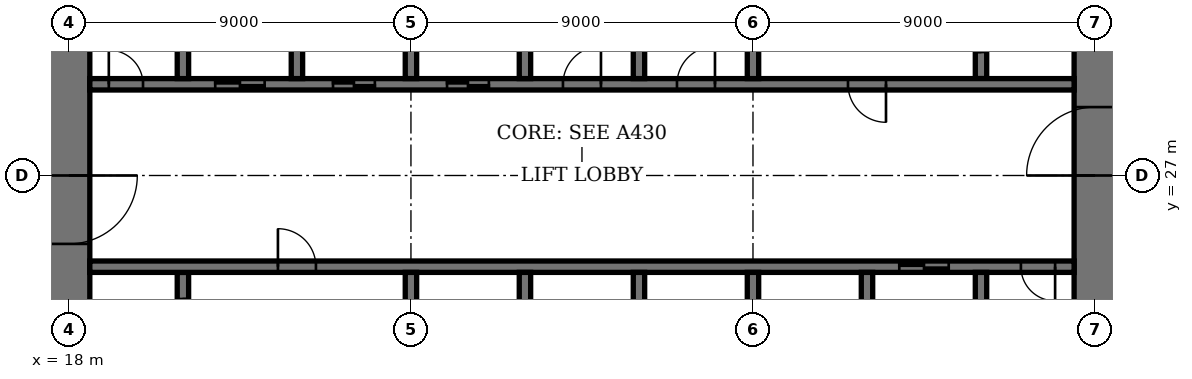
"""IFC4 building model, lengths in metres.
Left out: names, types, materials, properties, quantities, classifications, styles, units other than length and angle.
Written with IfcOpenShell. Run it as: python <this file> out.ifc"""

import sys

from ifc_helpers import new_model, si_unit, direction, frame, frame_2d, origin, place, context, subcontext, project, spatial, rectangle, extrude, element, fill, save


model = new_model("IFC4")
c1 = context("Model", 3, precision=1e-05, world=origin(), true_north=direction((0.0, 1.0)))
c2 = subcontext(c1, "Body", "Model", "MODEL_VIEW")
j1 = project(units=[si_unit("LENGTHUNIT", "METRE"), si_unit("PLANEANGLEUNIT", "RADIAN")], contexts=[c1])
p1 = place(None, origin())
s1 = spatial("IfcSite", under=j1, at=p1, CompositionType="ELEMENT")
p2 = place(p1, origin())
s2 = spatial("IfcBuilding", under=s1, at=p2, CompositionType="ELEMENT")
p3 = place(p2, frame((0.0, 0.0, 222.2)))
s3 = spatial("IfcBuildingStorey", under=s2, at=p3, CompositionType="ELEMENT", Elevation=222.2)
p4 = place(p3, frame((18.0, 35.45, 0.0), z_axis=(0.0, 0.0, 1.0), x_axis=(0.0, -1.0, 0.0)))
e1 = element("IfcWall", 1, at=p4, inside=s3, PredefinedType="SHEAR", context=c2, shape_type="SweptSolid", body=[
    extrude(rectangle(XDim=16.9, YDim=1.1, at=frame_2d((8.45, 0.0))), origin(), (0.0, 0.0, 1.0), 4.0),
])
p5 = place(p4, frame((8.45, 0.0, 0.0)))
e2 = element("IfcOpeningElement", 2, at=p5, cuts=e1, PredefinedType="OPENING", context=c2, shape_type="SweptSolid", body=[
    extrude(rectangle(XDim=1.8, YDim=2.4, at=frame_2d((0.9, 1.2))), frame((0.0, 0.56, 0.0), z_axis=(0.0, -1.0, 0.0), x_axis=(1.0, 0.0, 0.0)), (0.0, 0.0, 1.0), 1.12),
])
p6 = place(p3, frame((45.0, 18.55, 0.0), z_axis=(0.0, 0.0, 1.0), x_axis=(0.0, 1.0, 0.0)))
e3 = element("IfcWall", 3, at=p6, inside=s3, PredefinedType="SHEAR", context=c2, shape_type="SweptSolid", body=[
    extrude(rectangle(XDim=16.9, YDim=1.1, at=frame_2d((8.45, 0.0))), origin(), (0.0, 0.0, 1.0), 4.0),
])
p7 = place(p6, frame((8.45, 0.0, 0.0)))
e4 = element("IfcOpeningElement", 4, at=p7, cuts=e3, PredefinedType="OPENING", context=c2, shape_type="SweptSolid", body=[
    extrude(rectangle(XDim=1.8, YDim=2.4, at=frame_2d((0.9, 1.2))), frame((0.0, 0.56, 0.0), z_axis=(0.0, -1.0, 0.0), x_axis=(1.0, 0.0, 0.0)), (0.0, 0.0, 1.0), 1.12),
])
p8 = place(p3, frame((21.0, 21.95, 0.0), z_axis=(0.0, 0.0, 1.0), x_axis=(0.0, 1.0, 0.0)))
e5 = element("IfcWall", 5, at=p8, inside=s3, PredefinedType="SHEAR", context=c2, shape_type="SweptSolid", body=[
    extrude(rectangle(XDim=2.5, YDim=0.3, at=frame_2d((1.25, 0.0))), origin(), (0.0, 0.0, 1.0), 4.0),
])
p9 = place(p8, frame((0.7, 0.0, 0.0)))
e6 = element("IfcOpeningElement", 6, at=p9, cuts=e5, PredefinedType="OPENING", context=c2, shape_type="SweptSolid", body=[
    extrude(rectangle(XDim=1.1, YDim=2.4, at=frame_2d((0.55, 1.2))), frame((0.0, 0.16, 0.0), z_axis=(0.0, -1.0, 0.0), x_axis=(1.0, 0.0, 0.0)), (0.0, 0.0, 1.0), 0.32),
])
p10 = place(p3, frame((42.0, 29.55, 0.0), z_axis=(0.0, 0.0, 1.0), x_axis=(0.0, 1.0, 0.0)))
e7 = element("IfcWall", 7, at=p10, inside=s3, PredefinedType="SHEAR", context=c2, shape_type="SweptSolid", body=[
    extrude(rectangle(XDim=2.5, YDim=0.3, at=frame_2d((1.25, 0.0))), origin(), (0.0, 0.0, 1.0), 4.0),
])
p11 = place(p10, frame((0.7, 0.0, 0.0)))
e8 = element("IfcOpeningElement", 8, at=p11, cuts=e7, PredefinedType="OPENING", context=c2, shape_type="SweptSolid", body=[
    extrude(rectangle(XDim=1.1, YDim=2.4, at=frame_2d((0.55, 1.2))), frame((0.0, 0.16, 0.0), z_axis=(0.0, -1.0, 0.0), x_axis=(1.0, 0.0, 0.0)), (0.0, 0.0, 1.0), 0.32),
])
p12 = place(p3, frame((18.55, 24.6, 0.0), z_axis=(0.0, 0.0, 1.0), x_axis=(1.0, 0.0, 0.0)))
e9 = element("IfcWall", 9, at=p12, inside=s3, PredefinedType="SHEAR", context=c2, shape_type="SweptSolid", body=[
    extrude(rectangle(XDim=25.9, YDim=0.3, at=frame_2d((12.95, 0.0))), origin(), (0.0, 0.0, 1.0), 4.0),
])
p13 = place(p12, frame((4.95, 0.0, 0.0)))
e10 = element("IfcOpeningElement", 10, at=p13, cuts=e9, PredefinedType="OPENING", context=c2, shape_type="SweptSolid", body=[
    extrude(rectangle(XDim=1.0, YDim=2.4, at=frame_2d((0.5, 1.2))), frame((0.0, 0.16, 0.0), z_axis=(0.0, -1.0, 0.0), x_axis=(1.0, 0.0, 0.0)), (0.0, 0.0, 1.0), 0.32),
])
p14 = place(p12, frame((24.5, 0.0, 0.0)))
e11 = element("IfcOpeningElement", 11, at=p14, cuts=e9, PredefinedType="OPENING", context=c2, shape_type="SweptSolid", body=[
    extrude(rectangle(XDim=0.9, YDim=2.1, at=frame_2d((0.45, 1.05))), frame((0.0, 0.16, 0.0), z_axis=(0.0, -1.0, 0.0), x_axis=(1.0, 0.0, 0.0)), (0.0, 0.0, 1.0), 0.32),
])
p15 = place(p12, frame((21.3, 0.0, 0.0)))
e12 = element("IfcOpeningElement", 12, at=p15, cuts=e9, PredefinedType="OPENING", context=c2, shape_type="SweptSolid", body=[
    extrude(rectangle(XDim=1.3, YDim=2.4, at=frame_2d((0.65, 1.2))), frame((0.0, 0.16, 0.0), z_axis=(0.0, -1.0, 0.0), x_axis=(1.0, 0.0, 0.0)), (0.0, 0.0, 1.0), 0.32),
])
p16 = place(p3, frame((18.55, 29.4, 0.0), z_axis=(0.0, 0.0, 1.0), x_axis=(1.0, 0.0, 0.0)))
e13 = element("IfcWall", 13, at=p16, inside=s3, PredefinedType="SHEAR", context=c2, shape_type="SweptSolid", body=[
    extrude(rectangle(XDim=25.9, YDim=0.3, at=frame_2d((12.95, 0.0))), origin(), (0.0, 0.0, 1.0), 4.0),
])
p17 = place(p16, frame((19.95, 0.0, 0.0)))
e14 = element("IfcOpeningElement", 14, at=p17, cuts=e13, PredefinedType="OPENING", context=c2, shape_type="SweptSolid", body=[
    extrude(rectangle(XDim=1.0, YDim=2.4, at=frame_2d((0.5, 1.2))), frame((0.0, 0.16, 0.0), z_axis=(0.0, -1.0, 0.0), x_axis=(1.0, 0.0, 0.0)), (0.0, 0.0, 1.0), 0.32),
])
p18 = place(p16, frame((0.5, 0.0, 0.0)))
e15 = element("IfcOpeningElement", 15, at=p18, cuts=e13, PredefinedType="OPENING", context=c2, shape_type="SweptSolid", body=[
    extrude(rectangle(XDim=0.9, YDim=2.1, at=frame_2d((0.45, 1.05))), frame((0.0, 0.16, 0.0), z_axis=(0.0, -1.0, 0.0), x_axis=(1.0, 0.0, 0.0)), (0.0, 0.0, 1.0), 0.32),
])
p19 = place(p16, frame((15.45, 0.0, 0.0)))
e16 = element("IfcOpeningElement", 16, at=p19, cuts=e13, PredefinedType="OPENING", context=c2, shape_type="SweptSolid", body=[
    extrude(rectangle(XDim=1.0, YDim=2.4, at=frame_2d((0.5, 1.2))), frame((0.0, 0.16, 0.0), z_axis=(0.0, -1.0, 0.0), x_axis=(1.0, 0.0, 0.0)), (0.0, 0.0, 1.0), 0.32),
])
p20 = place(p16, frame((12.45, 0.0, 0.0)))
e17 = element("IfcOpeningElement", 17, at=p20, cuts=e13, PredefinedType="OPENING", context=c2, shape_type="SweptSolid", body=[
    extrude(rectangle(XDim=1.0, YDim=2.4, at=frame_2d((0.5, 1.2))), frame((0.0, 0.16, 0.0), z_axis=(0.0, -1.0, 0.0), x_axis=(1.0, 0.0, 0.0)), (0.0, 0.0, 1.0), 0.32),
])
p21 = place(p16, frame((9.4, 0.0, 0.0)))
e18 = element("IfcOpeningElement", 18, at=p21, cuts=e13, PredefinedType="OPENING", context=c2, shape_type="SweptSolid", body=[
    extrude(rectangle(XDim=1.1, YDim=2.4, at=frame_2d((0.55, 1.2))), frame((0.0, 0.16, 0.0), z_axis=(0.0, -1.0, 0.0), x_axis=(1.0, 0.0, 0.0)), (0.0, 0.0, 1.0), 0.32),
])
p22 = place(p16, frame((6.4, 0.0, 0.0)))
e19 = element("IfcOpeningElement", 19, at=p22, cuts=e13, PredefinedType="OPENING", context=c2, shape_type="SweptSolid", body=[
    extrude(rectangle(XDim=1.1, YDim=2.4, at=frame_2d((0.55, 1.2))), frame((0.0, 0.16, 0.0), z_axis=(0.0, -1.0, 0.0), x_axis=(1.0, 0.0, 0.0)), (0.0, 0.0, 1.0), 0.32),
])
p23 = place(p16, frame((3.3, 0.0, 0.0)))
e20 = element("IfcOpeningElement", 20, at=p23, cuts=e13, PredefinedType="OPENING", context=c2, shape_type="SweptSolid", body=[
    extrude(rectangle(XDim=1.3, YDim=2.4, at=frame_2d((0.65, 1.2))), frame((0.0, 0.16, 0.0), z_axis=(0.0, -1.0, 0.0), x_axis=(1.0, 0.0, 0.0)), (0.0, 0.0, 1.0), 0.32),
])
for number, where, z_axis, x_axis in (
    (21, (30.0, 21.75, 0.0), (0.0, 0.0, 1.0), (0.0, 1.0, 0.0)),
    (22, (33.0, 29.55, 0.0), (0.0, 0.0, 1.0), (0.0, 1.0, 0.0)),
    (23, (33.0, 21.75, 0.0), (0.0, 0.0, 1.0), (0.0, 1.0, 0.0)),
    (24, (30.0, 29.55, 0.0), (0.0, 0.0, 1.0), (0.0, 1.0, 0.0)),
    (25, (36.0, 21.75, 0.0), (0.0, 0.0, 1.0), (0.0, 1.0, 0.0)),
    (26, (27.0, 29.55, 0.0), (0.0, 0.0, 1.0), (0.0, 1.0, 0.0)),
):
    element("IfcWall", number, at=place(p3, frame(where, z_axis=z_axis, x_axis=x_axis)), inside=s3, PredefinedType="SHEAR", context=c2, shape_type="SweptSolid", body=[
        extrude(rectangle(XDim=2.7, YDim=0.3, at=frame_2d((1.35, 0.0))), origin(), (0.0, 0.0, 1.0), 4.0),
    ])
for number, where, z_axis, x_axis in (
    (27, (39.0, 18.55, 0.0), (0.0, 0.0, 1.0), (0.0, 1.0, 0.0)),
    (28, (24.0, 29.55, 0.0), (0.0, 0.0, 1.0), (0.0, 1.0, 0.0)),
):
    element("IfcWall", number, at=place(p3, frame(where, z_axis=z_axis, x_axis=x_axis)), inside=s3, PredefinedType="SHEAR", context=c2, shape_type="SweptSolid", body=[
        extrude(rectangle(XDim=5.9, YDim=0.3, at=frame_2d((2.95, 0.0))), origin(), (0.0, 0.0, 1.0), 4.0),
    ])
for number, where, z_axis, x_axis in (
    (29, (42.0, 21.75, 0.0), (0.0, 0.0, 1.0), (0.0, 1.0, 0.0)),
    (30, (21.0, 29.55, 0.0), (0.0, 0.0, 1.0), (0.0, 1.0, 0.0)),
):
    element("IfcWall", number, at=place(p3, frame(where, z_axis=z_axis, x_axis=x_axis)), inside=s3, PredefinedType="SHEAR", context=c2, shape_type="SweptSolid", body=[
        extrude(rectangle(XDim=2.7, YDim=0.3, at=frame_2d((1.35, 0.0))), origin(), (0.0, 0.0, 1.0), 4.0),
    ])
for number, where, z_axis, x_axis in (
    (31, (27.0, 21.6, 0.0), (0.0, 0.0, 1.0), (0.0, 1.0, 0.0)),
    (32, (36.0, 29.55, 0.0), (0.0, 0.0, 1.0), (0.0, 1.0, 0.0)),
):
    element("IfcWall", number, at=place(p3, frame(where, z_axis=z_axis, x_axis=x_axis)), inside=s3, PredefinedType="SHEAR", context=c2, shape_type="SweptSolid", body=[
        extrude(rectangle(XDim=2.85, YDim=0.3, at=frame_2d((1.425, 0.0))), origin(), (0.0, 0.0, 1.0), 4.0),
    ])
p24 = place(p5, origin())
e33 = element("IfcDoor", 33, at=p24, inside=s3, OperationType="DOUBLE_DOOR_DOUBLE_SWING", PredefinedType="DOOR", context=c2, shape_type="SweptSolid", body=[
    extrude(rectangle(XDim=1.8, YDim=2.4, at=frame_2d((0.9, 1.2))), frame((0.0, 0.03, 0.0), z_axis=(0.0, -1.0, 0.0), x_axis=(1.0, 0.0, 0.0)), (0.0, 0.0, 1.0), 0.06),
    extrude(rectangle(XDim=0.04, YDim=2.4, at=frame_2d((0.02, 1.2))), frame((0.0, 0.55, 0.0), z_axis=(0.0, -1.0, 0.0), x_axis=(1.0, 0.0, 0.0)), (0.0, 0.0, 1.0), 1.1),
    extrude(rectangle(XDim=0.04, YDim=2.4, at=frame_2d((1.78, 1.2))), frame((0.0, 0.55, 0.0), z_axis=(0.0, -1.0, 0.0), x_axis=(1.0, 0.0, 0.0)), (0.0, 0.0, 1.0), 1.1),
    extrude(rectangle(XDim=1.8, YDim=0.04, at=frame_2d((0.9, 2.38))), frame((0.0, 0.55, 0.0), z_axis=(0.0, -1.0, 0.0), x_axis=(1.0, 0.0, 0.0)), (0.0, 0.0, 1.0), 1.1),
])
fill(e2, e33)
p25 = place(p7, origin())
e34 = element("IfcDoor", 34, at=p25, inside=s3, OperationType="DOUBLE_DOOR_DOUBLE_SWING", PredefinedType="DOOR", context=c2, shape_type="SweptSolid", body=[
    extrude(rectangle(XDim=1.8, YDim=2.4, at=frame_2d((0.9, 1.2))), frame((0.0, 0.03, 0.0), z_axis=(0.0, -1.0, 0.0), x_axis=(1.0, 0.0, 0.0)), (0.0, 0.0, 1.0), 0.06),
    extrude(rectangle(XDim=0.04, YDim=2.4, at=frame_2d((0.02, 1.2))), frame((0.0, 0.55, 0.0), z_axis=(0.0, -1.0, 0.0), x_axis=(1.0, 0.0, 0.0)), (0.0, 0.0, 1.0), 1.1),
    extrude(rectangle(XDim=0.04, YDim=2.4, at=frame_2d((1.78, 1.2))), frame((0.0, 0.55, 0.0), z_axis=(0.0, -1.0, 0.0), x_axis=(1.0, 0.0, 0.0)), (0.0, 0.0, 1.0), 1.1),
    extrude(rectangle(XDim=1.8, YDim=0.04, at=frame_2d((0.9, 2.38))), frame((0.0, 0.55, 0.0), z_axis=(0.0, -1.0, 0.0), x_axis=(1.0, 0.0, 0.0)), (0.0, 0.0, 1.0), 1.1),
])
fill(e4, e34)
p26 = place(p13, origin())
e35 = element("IfcDoor", 35, at=p26, inside=s3, OperationType="SINGLE_SWING_RIGHT", PredefinedType="DOOR", context=c2, shape_type="SweptSolid", body=[
    extrude(rectangle(XDim=1.0, YDim=2.4, at=frame_2d((0.5, 1.2))), frame((0.0, 0.03, 0.0), z_axis=(0.0, -1.0, 0.0), x_axis=(1.0, 0.0, 0.0)), (0.0, 0.0, 1.0), 0.06),
])
fill(e10, e35)
p27 = place(p17, origin())
e36 = element("IfcDoor", 36, at=p27, inside=s3, OperationType="SINGLE_SWING_RIGHT", PredefinedType="DOOR", context=c2, shape_type="SweptSolid", body=[
    extrude(rectangle(XDim=1.0, YDim=2.4, at=frame_2d((0.5, 1.2))), frame((0.0, 0.03, 0.0), z_axis=(0.0, -1.0, 0.0), x_axis=(1.0, 0.0, 0.0)), (0.0, 0.0, 1.0), 0.06),
])
fill(e14, e36)
p28 = place(p14, origin())
e37 = element("IfcDoor", 37, at=p28, inside=s3, OperationType="SINGLE_SWING_RIGHT", PredefinedType="DOOR", context=c2, shape_type="SweptSolid", body=[
    extrude(rectangle(XDim=0.9, YDim=2.1, at=frame_2d((0.45, 1.05))), frame((0.0, 0.03, 0.0), z_axis=(0.0, -1.0, 0.0), x_axis=(1.0, 0.0, 0.0)), (0.0, 0.0, 1.0), 0.06),
])
fill(e11, e37)
p29 = place(p18, origin())
e38 = element("IfcDoor", 38, at=p29, inside=s3, OperationType="SINGLE_SWING_RIGHT", PredefinedType="DOOR", context=c2, shape_type="SweptSolid", body=[
    extrude(rectangle(XDim=0.9, YDim=2.1, at=frame_2d((0.45, 1.05))), frame((0.0, 0.03, 0.0), z_axis=(0.0, -1.0, 0.0), x_axis=(1.0, 0.0, 0.0)), (0.0, 0.0, 1.0), 0.06),
])
fill(e15, e38)
p30 = place(p19, origin())
e39 = element("IfcDoor", 39, at=p30, inside=s3, OperationType="SINGLE_SWING_LEFT", PredefinedType="DOOR", context=c2, shape_type="SweptSolid", body=[
    extrude(rectangle(XDim=1.0, YDim=2.4, at=frame_2d((0.5, 1.2))), frame((0.0, 0.03, 0.0), z_axis=(0.0, -1.0, 0.0), x_axis=(1.0, 0.0, 0.0)), (0.0, 0.0, 1.0), 0.06),
])
fill(e16, e39)
p31 = place(p20, origin())
e40 = element("IfcDoor", 40, at=p31, inside=s3, OperationType="SINGLE_SWING_LEFT", PredefinedType="DOOR", context=c2, shape_type="SweptSolid", body=[
    extrude(rectangle(XDim=1.0, YDim=2.4, at=frame_2d((0.5, 1.2))), frame((0.0, 0.03, 0.0), z_axis=(0.0, -1.0, 0.0), x_axis=(1.0, 0.0, 0.0)), (0.0, 0.0, 1.0), 0.06),
])
fill(e17, e40)
p32 = place(p21, origin())
e41 = element("IfcDoor", 41, at=p32, inside=s3, OperationType="DOUBLE_DOOR_SLIDING", PredefinedType="DOOR", context=c2, shape_type="SweptSolid", body=[
    extrude(rectangle(XDim=1.1, YDim=2.4, at=frame_2d((0.55, 1.2))), frame((0.0, 0.02, 0.0), z_axis=(0.0, -1.0, 0.0), x_axis=(1.0, 0.0, 0.0)), (0.0, 0.0, 1.0), 0.04),
])
fill(e18, e41)
p33 = place(p22, origin())
e42 = element("IfcDoor", 42, at=p33, inside=s3, OperationType="DOUBLE_DOOR_SLIDING", PredefinedType="DOOR", context=c2, shape_type="SweptSolid", body=[
    extrude(rectangle(XDim=1.1, YDim=2.4, at=frame_2d((0.55, 1.2))), frame((0.0, 0.02, 0.0), z_axis=(0.0, -1.0, 0.0), x_axis=(1.0, 0.0, 0.0)), (0.0, 0.0, 1.0), 0.04),
])
fill(e19, e42)
p34 = place(p15, origin())
e43 = element("IfcDoor", 43, at=p34, inside=s3, OperationType="DOUBLE_DOOR_SLIDING", PredefinedType="DOOR", context=c2, shape_type="SweptSolid", body=[
    extrude(rectangle(XDim=1.3, YDim=2.4, at=frame_2d((0.65, 1.2))), frame((0.0, 0.02, 0.0), z_axis=(0.0, -1.0, 0.0), x_axis=(1.0, 0.0, 0.0)), (0.0, 0.0, 1.0), 0.04),
])
fill(e12, e43)
p35 = place(p23, origin())
e44 = element("IfcDoor", 44, at=p35, inside=s3, OperationType="DOUBLE_DOOR_SLIDING", PredefinedType="DOOR", context=c2, shape_type="SweptSolid", body=[
    extrude(rectangle(XDim=1.3, YDim=2.4, at=frame_2d((0.65, 1.2))), frame((0.0, 0.02, 0.0), z_axis=(0.0, -1.0, 0.0), x_axis=(1.0, 0.0, 0.0)), (0.0, 0.0, 1.0), 0.04),
])
fill(e20, e44)
save(model, sys.argv[1])
